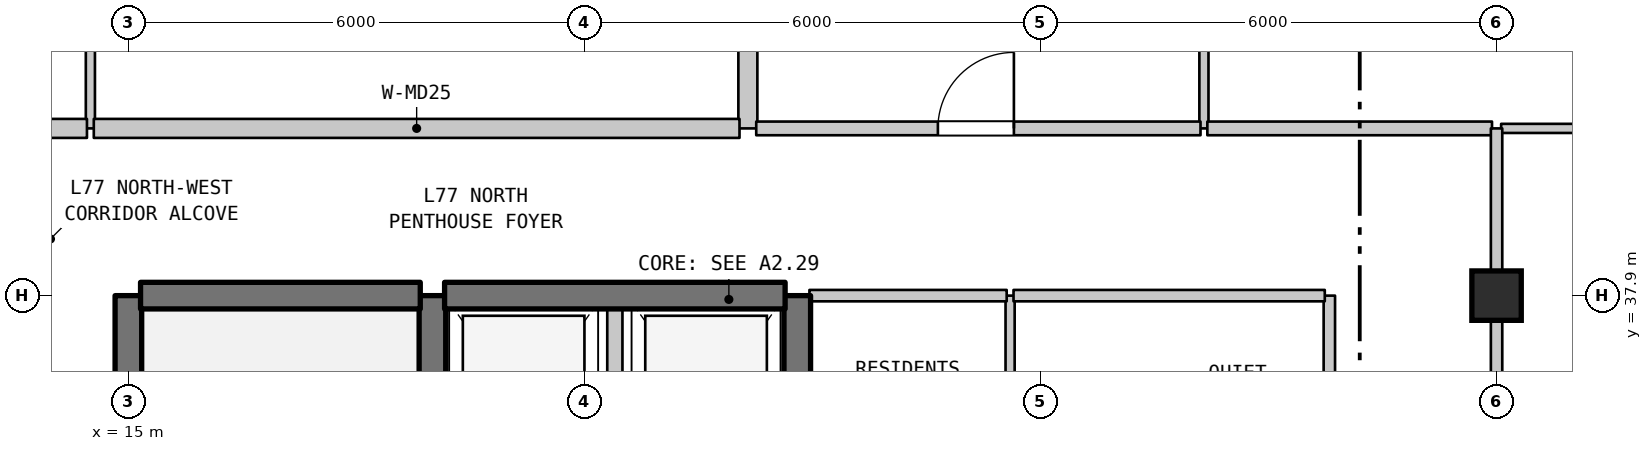
"""IFC4 building model, lengths in metres.
Left out: names, types, materials, properties, quantities, classifications, styles, units other than length and angle.
Written with IfcOpenShell. Run it as: python <this file> out.ifc"""

import sys

from ifc_helpers import new_model, si_unit, direction, frame, frame_2d, origin, origin_2d, place, context, subcontext, project, spatial, rectangle, extrude, element, fill, save


model = new_model("IFC4")
c1 = context("Model", 3, precision=1e-05, world=origin(), true_north=direction((0.0, 1.0)))
c2 = subcontext(c1, "Body", "Model", "MODEL_VIEW")
j1 = project(units=[si_unit("LENGTHUNIT", "METRE"), si_unit("PLANEANGLEUNIT", "RADIAN")], contexts=[c1])
p1 = place(None, origin())
s1 = spatial("IfcSite", under=j1, at=p1, CompositionType="ELEMENT")
p2 = place(p1, origin())
s2 = spatial("IfcBuilding", under=s1, at=p2, CompositionType="ELEMENT")
p3 = place(p2, frame((0.0, 0.0, 307.3)))
s3 = spatial("IfcBuildingStorey", under=s2, at=p3, CompositionType="ELEMENT", Elevation=307.3)
p4 = place(p3, frame((33.0, 37.9, 0.0), z_axis=(0.0, 0.0, 1.0), x_axis=(1.0, 0.0, 0.0)))
e1 = element("IfcColumn", 1, at=p4, inside=s3, PredefinedType="COLUMN", context=c2, shape_type="SweptSolid", body=[
    extrude(rectangle(XDim=0.65, YDim=0.65, at=origin_2d()), origin(), (0.0, 0.0, 1.0), 3.7),
])
p5 = place(p3, frame((14.5, 40.1, 0.0), z_axis=(0.0, 0.0, 1.0), x_axis=(0.0, 1.0, 0.0)))
e2 = element("IfcWall", 2, at=p5, inside=s3, PredefinedType="PARTITIONING", context=c2, shape_type="SweptSolid", body=[
    extrude(rectangle(XDim=4.2, YDim=0.12, at=frame_2d((2.1, 0.0))), origin(), (0.0, 0.0, 1.0), 3.39),
])
p6 = place(p3, frame((15.0, 31.1, 0.0), z_axis=(0.0, 0.0, 1.0), x_axis=(0.0, 1.0, 0.0)))
e3 = element("IfcWall", 3, at=p6, inside=s3, PredefinedType="SHEAR", context=c2, shape_type="SweptSolid", body=[
    extrude(rectangle(XDim=6.8, YDim=0.35, at=frame_2d((3.4, 0.0))), origin(), (0.0, 0.0, 1.0), 3.39),
])
p7 = place(p3, frame((19.0, 35.0, 0.0), z_axis=(0.0, 0.0, 1.0), x_axis=(0.0, 1.0, 0.0)))
e4 = element("IfcWall", 4, at=p7, inside=s3, PredefinedType="SHEAR", context=c2, shape_type="SweptSolid", body=[
    extrude(rectangle(XDim=2.9, YDim=0.35, at=frame_2d((1.45, 0.0))), origin(), (0.0, 0.0, 1.0), 3.39),
])
p8 = place(p3, frame((21.4, 35.0, 0.0), z_axis=(0.0, 0.0, 1.0), x_axis=(0.0, 1.0, 0.0)))
e5 = element("IfcWall", 5, at=p8, inside=s3, PredefinedType="STANDARD", context=c2, shape_type="SweptSolid", body=[
    extrude(rectangle(XDim=2.9, YDim=0.2, at=frame_2d((1.45, 0.0))), origin(), (0.0, 0.0, 1.0), 3.39),
])
p9 = place(p3, frame((23.15, 40.1, 0.0), z_axis=(0.0, 0.0, 1.0), x_axis=(0.0, 1.0, 0.0)))
e6 = element("IfcWall", 6, at=p9, inside=s3, PredefinedType="STANDARD", context=c2, shape_type="SweptSolid", body=[
    extrude(rectangle(XDim=4.2, YDim=0.25, at=frame_2d((2.1, 0.0))), origin(), (0.0, 0.0, 1.0), 3.39),
])
p10 = place(p9, frame((1.577, 0.0, 0.0)))
e7 = element("IfcOpeningElement", 7, at=p10, cuts=e6, PredefinedType="OPENING", context=c2, shape_type="SweptSolid", body=[
    extrude(rectangle(XDim=0.9, YDim=2.15, at=frame_2d((0.45, 1.075))), frame((0.0, 0.135, 0.0), z_axis=(0.0, -1.0, 0.0), x_axis=(1.0, 0.0, 0.0)), (0.0, 0.0, 1.0), 0.27),
])
p11 = place(p3, frame((23.8, 35.0, 0.0), z_axis=(0.0, 0.0, 1.0), x_axis=(0.0, 1.0, 0.0)))
e8 = element("IfcWall", 8, at=p11, inside=s3, PredefinedType="SHEAR", context=c2, shape_type="SweptSolid", body=[
    extrude(rectangle(XDim=2.9, YDim=0.35, at=frame_2d((1.45, 0.0))), origin(), (0.0, 0.0, 1.0), 3.39),
])
p12 = place(p3, frame((26.6, 35.0, 0.0), z_axis=(0.0, 0.0, 1.0), x_axis=(0.0, 1.0, 0.0)))
e9 = element("IfcWall", 9, at=p12, inside=s3, PredefinedType="PARTITIONING", context=c2, shape_type="SweptSolid", body=[
    extrude(rectangle(XDim=2.9, YDim=0.12, at=frame_2d((1.45, 0.0))), origin(), (0.0, 0.0, 1.0), 3.39),
])
p13 = place(p3, frame((29.15, 40.1, 0.0), z_axis=(0.0, 0.0, 1.0), x_axis=(0.0, 1.0, 0.0)))
e10 = element("IfcWall", 10, at=p13, inside=s3, PredefinedType="PARTITIONING", context=c2, shape_type="SweptSolid", body=[
    extrude(rectangle(XDim=13.79, YDim=0.12, at=frame_2d((6.895, 0.0))), origin(), (0.0, 0.0, 1.0), 3.39),
])
p14 = place(p13, frame((6.2, 0.0, 0.0)))
e11 = element("IfcOpeningElement", 11, at=p14, cuts=e10, PredefinedType="OPENING", context=c2, shape_type="SweptSolid", body=[
    extrude(rectangle(XDim=0.9, YDim=2.15, at=frame_2d((0.45, 1.075))), frame((0.0, 0.07, 0.0), z_axis=(0.0, -1.0, 0.0), x_axis=(1.0, 0.0, 0.0)), (0.0, 0.0, 1.0), 0.14),
])
p15 = place(p3, frame((30.8, 35.0, 0.0), z_axis=(0.0, 0.0, 1.0), x_axis=(0.0, 1.0, 0.0)))
e12 = element("IfcWall", 12, at=p15, inside=s3, PredefinedType="STANDARD", context=c2, shape_type="SweptSolid", body=[
    extrude(rectangle(XDim=2.9, YDim=0.15, at=frame_2d((1.45, 0.0))), origin(), (0.0, 0.0, 1.0), 3.39),
])
p16 = place(p3, frame((15.16, 37.9, 0.0), z_axis=(0.0, 0.0, 1.0), x_axis=(1.0, 0.0, 0.0)))
e13 = element("IfcWall", 13, at=p16, inside=s3, PredefinedType="SHEAR", context=c2, shape_type="SweptSolid", body=[
    extrude(rectangle(XDim=3.68, YDim=0.35, at=frame_2d((1.84, 0.0))), origin(), (0.0, 0.0, 1.0), 3.39),
])
p17 = place(p3, frame((19.16, 37.9, 0.0), z_axis=(0.0, 0.0, 1.0), x_axis=(1.0, 0.0, 0.0)))
e14 = element("IfcWall", 14, at=p17, inside=s3, PredefinedType="SHEAR", context=c2, shape_type="SweptSolid", body=[
    extrude(rectangle(XDim=4.48, YDim=0.35, at=frame_2d((2.24, 0.0))), origin(), (0.0, 0.0, 1.0), 3.39),
])
p18 = place(p3, frame((23.96, 37.9, 0.0), z_axis=(0.0, 0.0, 1.0), x_axis=(1.0, 0.0, 0.0)))
e15 = element("IfcWall", 15, at=p18, inside=s3, PredefinedType="STANDARD", context=c2, shape_type="SweptSolid", body=[
    extrude(rectangle(XDim=2.595, YDim=0.15, at=frame_2d((1.297, 0.0))), origin(), (0.0, 0.0, 1.0), 2.89),
])
p19 = place(p3, frame((26.645, 37.9, 0.0), z_axis=(0.0, 0.0, 1.0), x_axis=(1.0, 0.0, 0.0)))
e16 = element("IfcWall", 16, at=p19, inside=s3, PredefinedType="STANDARD", context=c2, shape_type="SweptSolid", body=[
    extrude(rectangle(XDim=4.095, YDim=0.15, at=frame_2d((2.047, 0.0))), origin(), (0.0, 0.0, 1.0), 2.89),
])
p20 = place(p3, frame((12.975, 40.1, 0.0), z_axis=(0.0, 0.0, 1.0), x_axis=(1.0, 0.0, 0.0)))
e17 = element("IfcWall", 17, at=p20, inside=s3, PredefinedType="STANDARD", context=c2, shape_type="SweptSolid", body=[
    extrude(rectangle(XDim=1.48, YDim=0.25, at=frame_2d((0.74, 0.0))), origin(), (0.0, 0.0, 1.0), 3.39),
])
p21 = place(p3, frame((14.545, 40.1, 0.0), z_axis=(0.0, 0.0, 1.0), x_axis=(1.0, 0.0, 0.0)))
e18 = element("IfcWall", 18, at=p21, inside=s3, PredefinedType="STANDARD", context=c2, shape_type="SweptSolid", body=[
    extrude(rectangle(XDim=8.495, YDim=0.25, at=frame_2d((4.248, 0.0))), origin(), (0.0, 0.0, 1.0), 3.39),
])
p22 = place(p3, frame((23.26, 40.1, 0.0), z_axis=(0.0, 0.0, 1.0), x_axis=(1.0, 0.0, 0.0)))
e19 = element("IfcWall", 19, at=p22, inside=s3, PredefinedType="STANDARD", context=c2, shape_type="SweptSolid", body=[
    extrude(rectangle(XDim=5.845, YDim=0.18, at=frame_2d((2.922, 0.0))), origin(), (0.0, 0.0, 1.0), 3.39),
])
p23 = place(p22, frame((2.39, 0.0, 0.0)))
e20 = element("IfcOpeningElement", 20, at=p23, cuts=e19, PredefinedType="OPENING", context=c2, shape_type="SweptSolid", body=[
    extrude(rectangle(XDim=1.0, YDim=2.15, at=frame_2d((0.5, 1.075))), frame((0.0, 0.1, 0.0), z_axis=(0.0, -1.0, 0.0), x_axis=(1.0, 0.0, 0.0)), (0.0, 0.0, 1.0), 0.2),
])
p24 = place(p3, frame((29.195, 40.1, 0.0), z_axis=(0.0, 0.0, 1.0), x_axis=(1.0, 0.0, 0.0)))
e21 = element("IfcWall", 21, at=p24, inside=s3, PredefinedType="STANDARD", context=c2, shape_type="SweptSolid", body=[
    extrude(rectangle(XDim=3.745, YDim=0.18, at=frame_2d((1.873, 0.0))), origin(), (0.0, 0.0, 1.0), 3.39),
])
p25 = place(p3, frame((33.06, 40.1, 0.0), z_axis=(0.0, 0.0, 1.0), x_axis=(1.0, 0.0, 0.0)))
e22 = element("IfcWall", 22, at=p25, inside=s3, PredefinedType="PARTITIONING", context=c2, shape_type="SweptSolid", body=[
    extrude(rectangle(XDim=1.115, YDim=0.12, at=frame_2d((0.558, 0.0))), origin(), (0.0, 0.0, 1.0), 3.39),
])
p26 = place(p3, frame((33.0, 27.9, 0.0), z_axis=(0.0, 0.0, 1.0), x_axis=(0.0, 1.0, 0.0)))
e23 = element("IfcWall", 23, at=p26, inside=s3, PredefinedType="STANDARD", context=c2, shape_type="SweptSolid", body=[
    extrude(rectangle(XDim=10.0, YDim=0.15, at=frame_2d((5.0, 0.0))), origin(), (0.0, 0.0, 1.0), 2.89),
])
p27 = place(p26, frame((1.4, 0.0, 0.0)))
e24 = element("IfcOpeningElement", 24, at=p27, cuts=e23, PredefinedType="OPENING", context=c2, shape_type="SweptSolid", body=[
    extrude(rectangle(XDim=1.0, YDim=2.15, at=frame_2d((0.5, 1.075))), frame((0.0, 0.085, 0.0), z_axis=(0.0, -1.0, 0.0), x_axis=(1.0, 0.0, 0.0)), (0.0, 0.0, 1.0), 0.17),
])
p28 = place(p3, frame((33.0, 37.9, 0.0), z_axis=(0.0, 0.0, 1.0), x_axis=(0.0, 1.0, 0.0)))
e25 = element("IfcWall", 25, at=p28, inside=s3, PredefinedType="STANDARD", context=c2, shape_type="SweptSolid", body=[
    extrude(rectangle(XDim=2.2, YDim=0.15, at=frame_2d((1.1, 0.0))), origin(), (0.0, 0.0, 1.0), 2.79),
])
p29 = place(p23, origin())
e26 = element("IfcDoor", 26, at=p29, inside=s3, OperationType="SINGLE_SWING_RIGHT", PredefinedType="DOOR", context=c2, shape_type="SweptSolid", body=[
    extrude(rectangle(XDim=1.0, YDim=2.15, at=frame_2d((0.5, 1.075))), frame((0.0, 0.025, 0.0), z_axis=(0.0, -1.0, 0.0), x_axis=(1.0, 0.0, 0.0)), (0.0, 0.0, 1.0), 0.05),
])
fill(e20, e26)
save(model, sys.argv[1])
